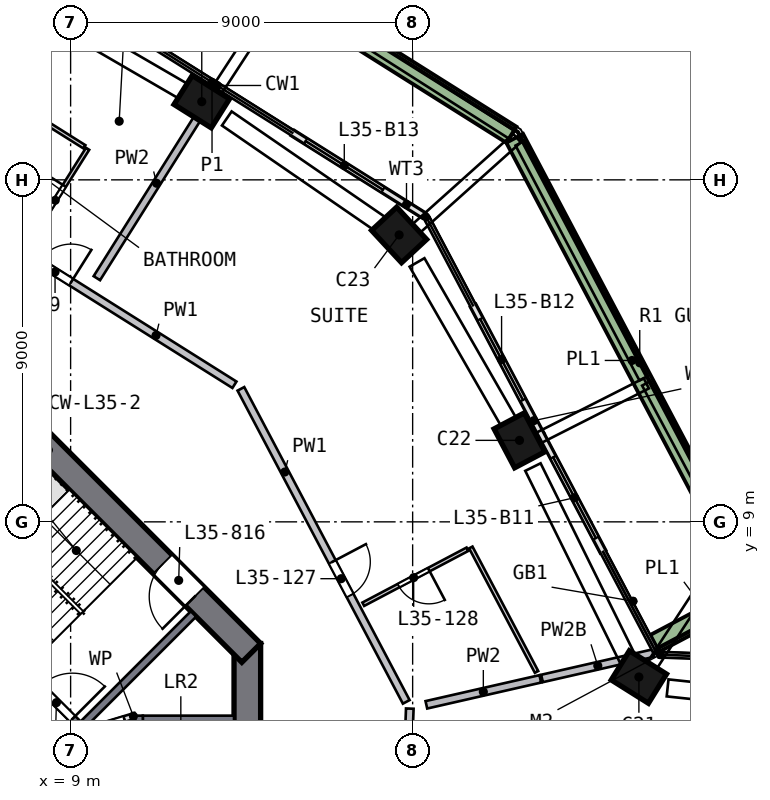
"""IFC4 building model, lengths in metres.
Left out: names, types, materials, properties, quantities, classifications, styles, units other than length and angle.
Written with IfcOpenShell. Run it as: python <this file> out.ifc"""

import sys

from ifc_helpers import new_model, si_unit, direction, frame, frame_2d, origin, origin_2d, place, context, subcontext, project, spatial, polyline, rectangle, outline, extrude, element, fill, save


model = new_model("IFC4")
c1 = context("Model", 3, precision=1e-05, world=origin(), true_north=direction((0.0, 1.0)))
c2 = subcontext(c1, "Body", "Model", "MODEL_VIEW")
j1 = project(units=[si_unit("LENGTHUNIT", "METRE"), si_unit("PLANEANGLEUNIT", "RADIAN")], contexts=[c1])
p1 = place(None, origin())
s1 = spatial("IfcSite", under=j1, at=p1, CompositionType="ELEMENT")
p2 = place(p1, origin())
s2 = spatial("IfcBuilding", under=s1, at=p2, CompositionType="ELEMENT")
p3 = place(p2, frame((0.0, 0.0, 147.0)))
s3 = spatial("IfcBuildingStorey", under=s2, at=p3, CompositionType="ELEMENT", Elevation=147.0)
p4 = place(p3, frame((23.982, 4.78, 0.0), z_axis=(-0.023716897, 0.113795495, 0.99322107), x_axis=(0.847615067, -0.524495353, 0.080332576)))
e1 = element("IfcColumn", 1, at=p4, inside=s3, PredefinedType="COLUMN", context=c2, shape_type="SweptSolid", body=[
    extrude(rectangle(XDim=1.15, YDim=0.9, at=origin_2d()), origin(), (0.0, 0.0, 1.0), 3.212),
])
p5 = place(p3, frame((20.876, 11.025, 0.0), z_axis=(-0.053235348, 0.098865646, 0.993675793), x_axis=(-0.463661004, 0.878869132, -0.112283222)))
e2 = element("IfcColumn", 2, at=p5, inside=s3, PredefinedType="COLUMN", context=c2, shape_type="SweptSolid", body=[
    extrude(rectangle(XDim=1.15, YDim=0.9, at=origin_2d()), origin(), (0.0, 0.0, 1.0), 3.21),
])
p6 = place(p3, frame((17.74, 16.45, 0.0), z_axis=(-0.07899095, 0.083704558, 0.99335491), x_axis=(0.67561408, -0.728217367, 0.115087276)))
e3 = element("IfcColumn", 3, at=p6, inside=s3, PredefinedType="COLUMN", context=c2, shape_type="SweptSolid", body=[
    extrude(rectangle(XDim=1.15, YDim=0.9, at=origin_2d()), origin(), (0.0, 0.0, 1.0), 3.211),
])
p7 = place(p3, frame((12.566, 19.986, 0.0), z_axis=(-0.095595288, 0.05893902, 0.993673856), x_axis=(-0.841376242, 0.528653619, -0.112300359)))
e4 = element("IfcColumn", 4, at=p7, inside=s3, PredefinedType="COLUMN", context=c2, shape_type="SweptSolid", body=[
    extrude(rectangle(XDim=1.15, YDim=0.9, at=origin_2d()), origin(), (0.0, 0.0, 1.0), 3.21),
])
p8 = place(p3, frame((13.65, -5.799, 0.0), z_axis=(0.0, 0.0, 1.0), x_axis=(0.0, 1.0, 0.0)))
e5 = element("IfcWall", 5, at=p8, inside=s3, PredefinedType="SHEAR", context=c2, shape_type="SweptSolid", body=[
    extrude(rectangle(XDim=11.598, YDim=0.7, at=frame_2d((5.799, 0.0))), origin(), (0.0, 0.0, 1.0), 3.5),
])
p9 = place(p8, frame((4.899, 0.0, 0.0)))
e6 = element("IfcOpeningElement", 6, at=p9, cuts=e5, PredefinedType="OPENING", context=c2, shape_type="SweptSolid", body=[
    extrude(rectangle(XDim=1.8, YDim=2.1, at=frame_2d((0.9, 1.05))), frame((0.0, 0.36, 0.0), z_axis=(0.0, -1.0, 0.0), x_axis=(1.0, 0.0, 0.0)), (0.0, 0.0, 1.0), 0.72),
])
p10 = place(p3, frame((13.752, 5.552, 0.0), z_axis=(0.0, 0.0, 1.0), x_axis=(-0.707106781, 0.707106781, 0.0)))
e7 = element("IfcWall", 7, at=p10, inside=s3, PredefinedType="SHEAR", context=c2, shape_type="SweptSolid", body=[
    extrude(rectangle(XDim=11.598, YDim=0.7, at=frame_2d((5.799, 0.0))), origin(), (0.0, 0.0, 1.0), 3.5),
])
p11 = place(p10, frame((2.099, 0.0, 0.0)))
e8 = element("IfcOpeningElement", 8, at=p11, cuts=e7, PredefinedType="OPENING", context=c2, shape_type="SweptSolid", body=[
    extrude(rectangle(XDim=1.2, YDim=2.1, at=frame_2d((0.6, 1.05))), frame((0.0, 0.36, 0.0), z_axis=(0.0, -1.0, 0.0), x_axis=(1.0, 0.0, 0.0)), (0.0, 0.0, 1.0), 0.72),
])
p12 = place(p3, frame((23.007, 8.221, 0.0), z_axis=(0.0, 0.0, 1.0), x_axis=(-0.466999775, 0.884257434, 0.0)))
e9 = element("IfcWall", 9, at=p12, inside=s3, PredefinedType="SOLIDWALL", context=c2, shape_type="SweptSolid", body=[
    extrude(rectangle(XDim=3.475, YDim=0.15, at=frame_2d((1.737, 0.0))), origin(), (0.0, 0.0, 1.0), 2.475),
])
p13 = place(p12, frame((0.4, 0.0, 0.0)))
e10 = element("IfcOpeningElement", 10, at=p13, cuts=e9, PredefinedType="OPENING", context=c2, shape_type="SweptSolid", body=[
    extrude(rectangle(XDim=2.4, YDim=2.4, at=frame_2d((1.2, 1.2))), frame((0.0, 0.085, 0.0), z_axis=(0.0, -1.0, 0.0), x_axis=(1.0, 0.0, 0.0)), (0.0, 0.0, 1.0), 0.17),
])
p14 = place(p3, frame((21.384, 11.294, 0.0), z_axis=(0.0, 0.0, 1.0), x_axis=(-0.467013054, 0.884250421, 0.0)))
e11 = element("IfcWall", 11, at=p14, inside=s3, PredefinedType="SOLIDWALL", context=c2, shape_type="SweptSolid", body=[
    extrude(rectangle(XDim=3.835, YDim=0.15, at=frame_2d((1.918, 0.0))), origin(), (0.0, 0.0, 1.0), 2.475),
])
p15 = place(p14, frame((1.035, 0.0, 0.0)))
e12 = element("IfcOpeningElement", 12, at=p15, cuts=e11, PredefinedType="OPENING", context=c2, shape_type="SweptSolid", body=[
    extrude(rectangle(XDim=2.4, YDim=2.4, at=frame_2d((1.2, 1.2))), frame((0.0, 0.085, 0.0), z_axis=(0.0, -1.0, 0.0), x_axis=(1.0, 0.0, 0.0)), (0.0, 0.0, 1.0), 0.17),
])
p16 = place(p3, frame((18.29, 17.066, 0.0), z_axis=(0.0, 0.0, 1.0), x_axis=(-0.846555415, 0.532300601, 0.0)))
e13 = element("IfcWall", 13, at=p16, inside=s3, PredefinedType="SOLIDWALL", context=c2, shape_type="SweptSolid", body=[
    extrude(rectangle(XDim=4.068, YDim=0.15, at=frame_2d((2.034, 0.0))), origin(), (0.0, 0.0, 1.0), 2.475),
])
p17 = place(p16, frame((1.268, 0.0, 0.0)))
e14 = element("IfcOpeningElement", 14, at=p17, cuts=e13, PredefinedType="OPENING", context=c2, shape_type="SweptSolid", body=[
    extrude(rectangle(XDim=2.4, YDim=2.4, at=frame_2d((1.2, 1.2))), frame((0.0, 0.085, 0.0), z_axis=(0.0, -1.0, 0.0), x_axis=(1.0, 0.0, 0.0)), (0.0, 0.0, 1.0), 0.17),
])
p18 = place(p3, frame((24.37, 5.802, 0.0), z_axis=(0.0, 0.0, 1.0), x_axis=(0.884238577, 0.467035479, 0.0)))
e15 = element("IfcWall", 15, at=p18, inside=s3, PredefinedType="SOLIDWALL", context=c2, shape_type="SweptSolid", body=[
    extrude(rectangle(XDim=3.199, YDim=0.5, at=frame_2d((1.6, 0.0))), origin(), (0.0, 0.0, 1.0), 0.7),
])
p19 = place(p3, frame((26.861, 7.401, 0.0), z_axis=(0.0, 0.0, 1.0), x_axis=(-0.466998474, 0.884258121, 0.0)))
e16 = element("IfcWall", 16, at=p19, inside=s3, PredefinedType="SOLIDWALL", context=c2, shape_type="SweptSolid", body=[
    extrude(rectangle(XDim=13.223, YDim=0.5, at=frame_2d((6.612, 0.0))), origin(), (0.0, 0.0, 1.0), 0.7),
])
p20 = place(p3, frame((20.598, 19.189, 0.0), z_axis=(0.0, 0.0, 1.0), x_axis=(-0.846566005, 0.532283757, 0.0)))
e17 = element("IfcWall", 17, at=p20, inside=s3, PredefinedType="SOLIDWALL", context=c2, shape_type="SweptSolid", body=[
    extrude(rectangle(XDim=13.723, YDim=0.5, at=frame_2d((6.862, 0.0))), origin(), (0.0, 0.0, 1.0), 0.7),
])
p21 = place(p3, origin())
e18 = element("IfcWall", 18, at=p21, inside=s3, PredefinedType="SOLIDWALL", context=c2, shape_type="SweptSolid", body=[
    extrude(outline(polyline([(13.3, 3.9), (13.3, 1.2), (10.9, 1.2), (10.9, 1.4), (12.9, 1.4), (12.9, 3.7), (10.9, 3.7), (10.9, 3.9), (13.3, 3.9)])), origin(), (0.0, 0.0, 1.0), 3.19),
])
p22 = place(p3, frame((10.8, 1.2, 0.0), z_axis=(0.0, 0.0, 1.0), x_axis=(0.0, 1.0, 0.0)))
e19 = element("IfcWall", 19, at=p22, inside=s3, PredefinedType="SOLIDWALL", context=c2, shape_type="SweptSolid", body=[
    extrude(rectangle(XDim=2.7, YDim=0.2, at=frame_2d((1.35, 0.0))), origin(), (0.0, 0.0, 1.0), 3.19),
])
p23 = place(p22, frame((0.75, 0.0, 0.0)))
e20 = element("IfcOpeningElement", 20, at=p23, cuts=e19, PredefinedType="OPENING", context=c2, shape_type="SweptSolid", body=[
    extrude(rectangle(XDim=1.2, YDim=2.1, at=frame_2d((0.6, 1.05))), frame((0.0, 0.11, 0.0), z_axis=(0.0, -1.0, 0.0), x_axis=(1.0, 0.0, 0.0)), (0.0, 0.0, 1.0), 0.22),
])
p24 = place(p3, frame((3.535, 9.334, 0.0), z_axis=(0.0, 0.0, 1.0), x_axis=(0.707106781, -0.707106781, 0.0)))
e21 = element("IfcWall", 21, at=p24, inside=s3, PredefinedType="SOLIDWALL", context=c2, shape_type="SweptSolid", body=[
    extrude(rectangle(XDim=8.2, YDim=0.2, at=frame_2d((4.1, 0.0))), origin(), (0.0, 0.0, 1.0), 3.19),
])
p25 = place(p24, frame((6.6, 0.0, 0.0)))
e22 = element("IfcOpeningElement", 22, at=p25, cuts=e21, PredefinedType="OPENING", context=c2, shape_type="SweptSolid", body=[
    extrude(rectangle(XDim=1.2, YDim=2.1, at=frame_2d((0.6, 1.05))), frame((0.0, 0.11, 0.0), z_axis=(0.0, -1.0, 0.0), x_axis=(1.0, 0.0, 0.0)), (0.0, 0.0, 1.0), 0.22),
])
p26 = place(p3, frame((9.334, 3.677, 0.0), z_axis=(0.0, 0.0, 1.0), x_axis=(0.707106781, 0.707106781, 0.0)))
e23 = element("IfcWall", 23, at=p26, inside=s3, PredefinedType="SOLIDWALL", context=c2, shape_type="SweptSolid", body=[
    extrude(rectangle(XDim=4.1, YDim=0.2, at=frame_2d((2.05, 0.0))), origin(), (0.0, 0.0, 1.0), 3.19),
])
p27 = place(p3, frame((10.7, 3.9, 0.0), z_axis=(0.0, 0.0, 1.0), x_axis=(-0.957084567, -0.289808785, 0.0)))
e24 = element("IfcWall", 24, at=p27, inside=s3, PredefinedType="PARTITIONING", context=c2, shape_type="SweptSolid", body=[
    extrude(rectangle(XDim=1.501, YDim=0.15, at=frame_2d((0.75, 0.0))), origin(), (0.0, 0.0, 1.0), 3.19),
])
p28 = place(p27, frame((0.301, 0.0, 0.0)))
e25 = element("IfcOpeningElement", 25, at=p28, cuts=e24, PredefinedType="OPENING", context=c2, shape_type="SweptSolid", body=[
    extrude(rectangle(XDim=0.9, YDim=2.1, at=frame_2d((0.45, 1.05))), frame((0.0, 0.085, 0.0), z_axis=(0.0, -1.0, 0.0), x_axis=(1.0, 0.0, 0.0)), (0.0, 0.0, 1.0), 0.17),
])
p29 = place(p3, frame((5.407, 17.577, 0.0), z_axis=(0.0, 0.0, 1.0), x_axis=(0.846570227, -0.532277043, 0.0)))
e26 = element("IfcWall", 26, at=p29, inside=s3, PredefinedType="SOLIDWALL", context=c2, shape_type="SweptSolid", body=[
    extrude(rectangle(XDim=9.336, YDim=0.2, at=frame_2d((4.668, 0.0))), origin(), (0.0, 0.0, 1.0), 3.19),
])
p30 = place(p29, frame((3.26, 0.0, 0.0)))
e27 = element("IfcOpeningElement", 27, at=p30, cuts=e26, PredefinedType="OPENING", context=c2, shape_type="SweptSolid", body=[
    extrude(rectangle(XDim=1.0, YDim=2.1, at=frame_2d((0.5, 1.05))), frame((0.0, 0.11, 0.0), z_axis=(0.0, -1.0, 0.0), x_axis=(1.0, 0.0, 0.0)), (0.0, 0.0, 1.0), 0.22),
])
p31 = place(p3, frame((13.481, 12.5, 0.0), z_axis=(0.0, 0.0, 1.0), x_axis=(0.466998873, -0.884257911, 0.0)))
e28 = element("IfcWall", 28, at=p31, inside=s3, PredefinedType="SOLIDWALL", context=c2, shape_type="SweptSolid", body=[
    extrude(rectangle(XDim=9.316, YDim=0.2, at=frame_2d((4.658, 0.0))), origin(), (0.0, 0.0, 1.0), 3.19),
])
p32 = place(p31, frame((5.15, 0.0, 0.0)))
e29 = element("IfcOpeningElement", 29, at=p32, cuts=e28, PredefinedType="OPENING", context=c2, shape_type="SweptSolid", body=[
    extrude(rectangle(XDim=1.0, YDim=2.1, at=frame_2d((0.5, 1.05))), frame((0.0, 0.11, 0.0), z_axis=(0.0, -1.0, 0.0), x_axis=(1.0, 0.0, 0.0)), (0.0, 0.0, 1.0), 0.22),
])
p33 = place(p3, frame((17.795, 0.63, 0.0), z_axis=(0.0, 0.0, 1.0), x_axis=(0.037698369, 0.999289164, 0.0)))
e30 = element("IfcWall", 30, at=p33, inside=s3, PredefinedType="SOLIDWALL", context=c2, shape_type="SweptSolid", body=[
    extrude(rectangle(XDim=3.458, YDim=0.2, at=frame_2d((1.729, 0.0))), origin(), (0.0, 0.0, 1.0), 3.19),
])
p34 = place(p3, frame((9.691, 15.412, 0.0), z_axis=(0.0, 0.0, 1.0), x_axis=(0.532272342, 0.846573183, 0.0)))
e31 = element("IfcWall", 31, at=p34, inside=s3, PredefinedType="SOLIDWALL", context=c2, shape_type="SweptSolid", body=[
    extrude(rectangle(XDim=5.903, YDim=0.2, at=frame_2d((2.951, 0.0))), origin(), (0.0, 0.0, 1.0), 3.19),
])
p35 = place(p3, frame((18.361, 4.185, 0.0), z_axis=(0.0, 0.0, 1.0), x_axis=(0.974989915, 0.222249106, 0.0)))
e32 = element("IfcWall", 32, at=p35, inside=s3, PredefinedType="SOLIDWALL", context=c2, shape_type="SweptSolid", body=[
    extrude(rectangle(XDim=3.075, YDim=0.2, at=frame_2d((1.537, 0.0))), origin(), (0.0, 0.0, 1.0), 3.19),
])
p36 = place(p3, frame((21.404, 4.878, 0.0), z_axis=(0.0, 0.0, 1.0), x_axis=(0.974995688, 0.22222378, 0.0)))
e33 = element("IfcWall", 33, at=p36, inside=s3, PredefinedType="SOLIDWALL", context=c2, shape_type="SweptSolid", body=[
    extrude(rectangle(XDim=3.011, YDim=0.2, at=frame_2d((1.506, 0.0))), origin(), (0.0, 0.0, 1.0), 2.69),
])
p37 = place(p3, frame((7.249, 20.199, 0.0), z_axis=(0.0, 0.0, 1.0), x_axis=(0.846572341, -0.532273681, 0.0)))
e34 = element("IfcWall", 34, at=p37, inside=s3, PredefinedType="PARTITIONING", context=c2, shape_type="SweptSolid", body=[
    extrude(rectangle(XDim=2.497, YDim=0.1, at=frame_2d((1.248, 0.0))), origin(), (0.0, 0.0, 1.0), 3.19),
])
p38 = place(p3, frame((7.85, 16.277, 0.0), z_axis=(0.0, 0.0, 1.0), x_axis=(0.532286535, 0.846564259, 0.0)))
e35 = element("IfcWall", 35, at=p38, inside=s3, PredefinedType="PARTITIONING", context=c2, shape_type="SweptSolid", body=[
    extrude(rectangle(XDim=3.0, YDim=0.1, at=frame_2d((1.5, 0.0))), origin(), (0.0, 0.0, 1.0), 3.19),
])
p39 = place(p38, frame((0.95, 0.0, 0.0)))
e36 = element("IfcOpeningElement", 36, at=p39, cuts=e35, PredefinedType="OPENING", context=c2, shape_type="SweptSolid", body=[
    extrude(rectangle(XDim=0.9, YDim=2.1, at=frame_2d((0.45, 1.05))), frame((0.0, 0.06, 0.0), z_axis=(0.0, -1.0, 0.0), x_axis=(1.0, 0.0, 0.0)), (0.0, 0.0, 1.0), 0.12),
])
p40 = place(p3, frame((19.442, 8.28, 0.0), z_axis=(0.0, 0.0, 1.0), x_axis=(-0.884251068, -0.46701183, 0.0)))
e37 = element("IfcWall", 37, at=p40, inside=s3, PredefinedType="PARTITIONING", context=c2, shape_type="SweptSolid", body=[
    extrude(rectangle(XDim=3.1, YDim=0.1, at=frame_2d((1.55, 0.0))), origin(), (0.0, 0.0, 1.0), 3.19),
])
p41 = place(p40, frame((1.15, 0.0, 0.0)))
e38 = element("IfcOpeningElement", 38, at=p41, cuts=e37, PredefinedType="OPENING", context=c2, shape_type="SweptSolid", body=[
    extrude(rectangle(XDim=0.9, YDim=2.1, at=frame_2d((0.45, 1.05))), frame((0.0, 0.06, 0.0), z_axis=(0.0, -1.0, 0.0), x_axis=(1.0, 0.0, 0.0)), (0.0, 0.0, 1.0), 0.12),
])
p42 = place(p3, frame((19.531, 8.326, 0.0), z_axis=(0.0, 0.0, 1.0), x_axis=(0.467009214, -0.884252449, 0.0)))
e39 = element("IfcWall", 39, at=p42, inside=s3, PredefinedType="PARTITIONING", context=c2, shape_type="SweptSolid", body=[
    extrude(rectangle(XDim=3.704, YDim=0.1, at=frame_2d((1.852, 0.0))), origin(), (0.0, 0.0, 1.0), 3.19),
])
p43 = place(p13, origin())
e40 = element("IfcDoor", 40, at=p43, inside=s3, OperationType="SLIDING_TO_RIGHT", PredefinedType="DOOR", context=c2, shape_type="SweptSolid", body=[
    extrude(rectangle(XDim=2.4, YDim=2.4, at=frame_2d((1.2, 1.2))), frame((0.0, 0.025, 0.0), z_axis=(0.0, -1.0, 0.0), x_axis=(1.0, 0.0, 0.0)), (0.0, 0.0, 1.0), 0.05),
])
fill(e10, e40)
p44 = place(p15, origin())
e41 = element("IfcDoor", 41, at=p44, inside=s3, OperationType="SLIDING_TO_LEFT", PredefinedType="DOOR", context=c2, shape_type="SweptSolid", body=[
    extrude(rectangle(XDim=2.4, YDim=2.4, at=frame_2d((1.2, 1.2))), frame((0.0, 0.025, 0.0), z_axis=(0.0, -1.0, 0.0), x_axis=(1.0, 0.0, 0.0)), (0.0, 0.0, 1.0), 0.05),
])
fill(e12, e41)
p45 = place(p17, origin())
e42 = element("IfcDoor", 42, at=p45, inside=s3, OperationType="SLIDING_TO_LEFT", PredefinedType="DOOR", context=c2, shape_type="SweptSolid", body=[
    extrude(rectangle(XDim=2.4, YDim=2.4, at=frame_2d((1.2, 1.2))), frame((0.0, 0.025, 0.0), z_axis=(0.0, -1.0, 0.0), x_axis=(1.0, 0.0, 0.0)), (0.0, 0.0, 1.0), 0.05),
])
fill(e14, e42)
p46 = place(p25, origin())
e43 = element("IfcDoor", 43, at=p46, inside=s3, OperationType="SINGLE_SWING_RIGHT", PredefinedType="DOOR", context=c2, shape_type="SweptSolid", body=[
    extrude(rectangle(XDim=1.2, YDim=2.1, at=frame_2d((0.6, 1.05))), frame((0.0, 0.025, 0.0), z_axis=(0.0, -1.0, 0.0), x_axis=(1.0, 0.0, 0.0)), (0.0, 0.0, 1.0), 0.05),
])
fill(e22, e43)
p47 = place(p11, origin())
e44 = element("IfcDoor", 44, at=p47, inside=s3, OperationType="SINGLE_SWING_LEFT", PredefinedType="DOOR", context=c2, shape_type="SweptSolid", body=[
    extrude(rectangle(XDim=1.2, YDim=2.1, at=frame_2d((0.6, 1.05))), frame((0.0, 0.025, 0.0), z_axis=(0.0, -1.0, 0.0), x_axis=(1.0, 0.0, 0.0)), (0.0, 0.0, 1.0), 0.05),
])
fill(e8, e44)
p48 = place(p28, origin())
e45 = element("IfcDoor", 45, at=p48, inside=s3, OperationType="SINGLE_SWING_LEFT", PredefinedType="DOOR", context=c2, shape_type="SweptSolid", body=[
    extrude(rectangle(XDim=0.9, YDim=2.1, at=frame_2d((0.45, 1.05))), frame((0.0, 0.025, 0.0), z_axis=(0.0, -1.0, 0.0), x_axis=(1.0, 0.0, 0.0)), (0.0, 0.0, 1.0), 0.05),
])
fill(e25, e45)
p49 = place(p32, origin())
e46 = element("IfcDoor", 46, at=p49, inside=s3, OperationType="SINGLE_SWING_LEFT", PredefinedType="DOOR", context=c2, shape_type="SweptSolid", body=[
    extrude(rectangle(XDim=1.0, YDim=2.1, at=frame_2d((0.5, 1.05))), frame((0.0, 0.025, 0.0), z_axis=(0.0, -1.0, 0.0), x_axis=(1.0, 0.0, 0.0)), (0.0, 0.0, 1.0), 0.05),
])
fill(e29, e46)
p50 = place(p41, origin())
e47 = element("IfcDoor", 47, at=p50, inside=s3, OperationType="SINGLE_SWING_LEFT", PredefinedType="DOOR", context=c2, shape_type="SweptSolid", body=[
    extrude(rectangle(XDim=0.9, YDim=2.1, at=frame_2d((0.45, 1.05))), frame((0.0, 0.025, 0.0), z_axis=(0.0, -1.0, 0.0), x_axis=(1.0, 0.0, 0.0)), (0.0, 0.0, 1.0), 0.05),
])
fill(e38, e47)
p51 = place(p30, origin())
e48 = element("IfcDoor", 48, at=p51, inside=s3, OperationType="SINGLE_SWING_RIGHT", PredefinedType="DOOR", context=c2, shape_type="SweptSolid", body=[
    extrude(rectangle(XDim=1.0, YDim=2.1, at=frame_2d((0.5, 1.05))), frame((0.0, 0.025, 0.0), z_axis=(0.0, -1.0, 0.0), x_axis=(1.0, 0.0, 0.0)), (0.0, 0.0, 1.0), 0.05),
])
fill(e27, e48)
p52 = place(p39, origin())
e49 = element("IfcDoor", 49, at=p52, inside=s3, OperationType="SINGLE_SWING_RIGHT", PredefinedType="DOOR", context=c2, shape_type="SweptSolid", body=[
    extrude(rectangle(XDim=0.9, YDim=2.1, at=frame_2d((0.45, 1.05))), frame((0.0, 0.025, 0.0), z_axis=(0.0, -1.0, 0.0), x_axis=(1.0, 0.0, 0.0)), (0.0, 0.0, 1.0), 0.05),
])
fill(e36, e49)
save(model, sys.argv[1])
